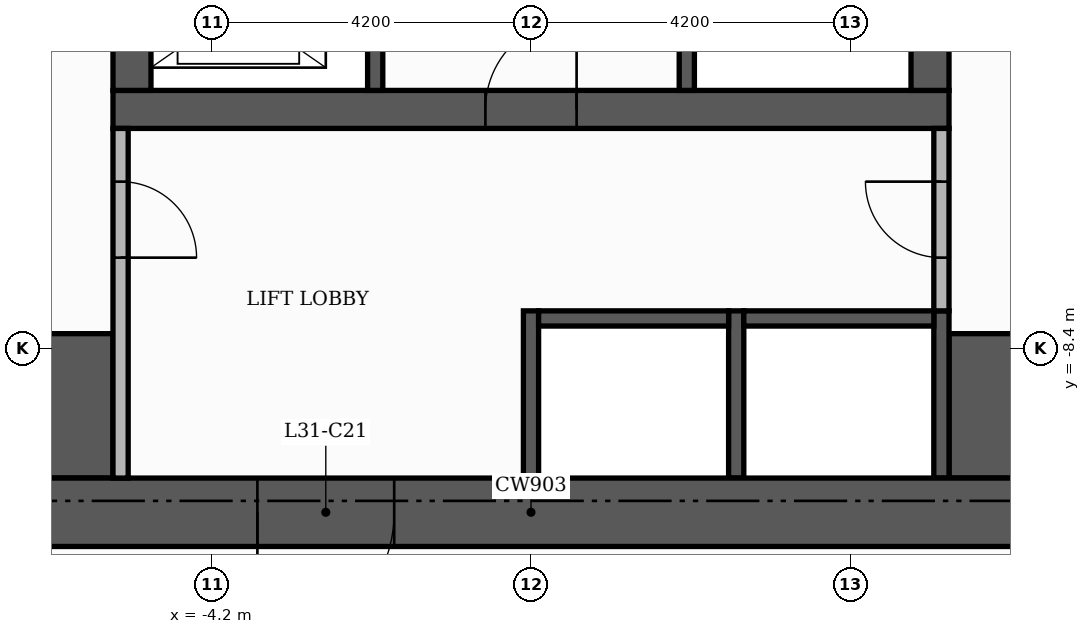
"""IFC4 building model, lengths in metres.
Left out: names, types, materials, properties, quantities, classifications, styles, units other than length and angle.
Written with IfcOpenShell. Run it as: python <this file> out.ifc"""

import sys

from ifc_helpers import new_model, si_unit, direction, frame, frame_2d, origin, place, context, subcontext, project, spatial, rectangle, extrude, element, fill, save


model = new_model("IFC4")
c1 = context("Model", 3, precision=1e-05, world=origin(), true_north=direction((0.0, 1.0)))
c2 = subcontext(c1, "Body", "Model", "MODEL_VIEW")
j1 = project(units=[si_unit("LENGTHUNIT", "METRE"), si_unit("PLANEANGLEUNIT", "RADIAN")], contexts=[c1])
p1 = place(None, origin())
s1 = spatial("IfcSite", under=j1, at=p1, CompositionType="ELEMENT")
p2 = place(p1, origin())
s2 = spatial("IfcBuilding", under=s1, at=p2, CompositionType="ELEMENT")
p3 = place(p2, frame((0.0, 0.0, 133.8)))
s3 = spatial("IfcBuildingStorey", under=s2, at=p3, CompositionType="ELEMENT", Elevation=133.8)
p4 = place(p3, frame((-5.5, -5.25, 0.0), z_axis=(0.0, 0.0, 1.0), x_axis=(1.0, 0.0, 0.0)))
e1 = element("IfcWall", 1, at=p4, inside=s3, PredefinedType="SHEAR", context=c2, shape_type="SweptSolid", body=[
    extrude(rectangle(XDim=11.0, YDim=0.5, at=frame_2d((5.5, 0.0))), origin(), (0.0, 0.0, 1.0), 3.48),
])
p5 = place(p4, frame((4.9, 0.0, 0.0)))
e2 = element("IfcOpeningElement", 2, at=p5, cuts=e1, PredefinedType="OPENING", context=c2, shape_type="SweptSolid", body=[
    extrude(rectangle(XDim=1.2, YDim=2.1, at=frame_2d((0.6, 1.05))), frame((0.0, 0.26, 0.0), z_axis=(0.0, -1.0, 0.0), x_axis=(1.0, 0.0, 0.0)), (0.0, 0.0, 1.0), 0.52),
])
for number, where, z_axis, x_axis in (
    (3, (-5.25, -5.0, 0.0), (0.0, 0.0, 1.0), (0.0, 1.0, 0.0)),
    (4, (5.25, -5.0, 0.0), (0.0, 0.0, 1.0), (0.0, 1.0, 0.0)),
):
    element("IfcWall", number, at=place(p3, frame(where, z_axis=z_axis, x_axis=x_axis)), inside=s3, PredefinedType="SHEAR", context=c2, shape_type="SweptSolid", body=[
        extrude(rectangle(XDim=10.5, YDim=0.5, at=frame_2d((5.25, 0.0))), origin(), (0.0, 0.0, 1.0), 3.48),
    ])
for number, where, z_axis, x_axis in (
    (5, (-10.1, -9.15, 0.0), (0.0, 0.0, 1.0), (1.0, 0.0, 0.0)),
    (6, (5.5, -9.15, 0.0), (0.0, 0.0, 1.0), (1.0, 0.0, 0.0)),
):
    element("IfcWall", number, at=place(p3, frame(where, z_axis=z_axis, x_axis=x_axis)), inside=s3, PredefinedType="SHEAR", context=c2, shape_type="SweptSolid", body=[
        extrude(rectangle(XDim=4.6, YDim=1.9, at=frame_2d((2.3, 0.0))), origin(), (0.0, 0.0, 1.0), 3.48),
    ])
p6 = place(p3, frame((2.05, -5.0, 0.0), z_axis=(0.0, 0.0, 1.0), x_axis=(0.0, 1.0, 0.0)))
e7 = element("IfcWall", 7, at=p6, inside=s3, PredefinedType="SHEAR", context=c2, shape_type="SweptSolid", body=[
    extrude(rectangle(XDim=6.6, YDim=0.2, at=frame_2d((3.3, 0.0))), origin(), (0.0, 0.0, 1.0), 3.48),
])
p7 = place(p6, frame((5.25, 0.0, 0.0)))
e8 = element("IfcOpeningElement", 8, at=p7, cuts=e7, PredefinedType="OPENING", context=c2, shape_type="SweptSolid", body=[
    extrude(rectangle(XDim=1.0, YDim=2.1, at=frame_2d((0.5, 1.05))), frame((0.0, 0.11, 0.0), z_axis=(0.0, -1.0, 0.0), x_axis=(1.0, 0.0, 0.0)), (0.0, 0.0, 1.0), 0.22),
])
for number, where, z_axis, x_axis in (
    (9, (0.0, -10.1, 0.0), (0.0, 0.0, 1.0), (0.0, 1.0, 0.0)),
    (10, (2.7, -10.1, 0.0), (0.0, 0.0, 1.0), (0.0, 1.0, 0.0)),
    (11, (5.4, -10.1, 0.0), (0.0, 0.0, 1.0), (0.0, 1.0, 0.0)),
):
    element("IfcWall", number, at=place(p3, frame(where, z_axis=z_axis, x_axis=x_axis)), inside=s3, PredefinedType="SHEAR", context=c2, shape_type="SweptSolid", body=[
        extrude(rectangle(XDim=2.2, YDim=0.2, at=frame_2d((1.1, 0.0))), origin(), (0.0, 0.0, 1.0), 3.48),
    ])
for number, where, z_axis, x_axis in (
    (12, (0.1, -8.0, 0.0), (0.0, 0.0, 1.0), (1.0, 0.0, 0.0)),
    (13, (2.8, -8.0, 0.0), (0.0, 0.0, 1.0), (1.0, 0.0, 0.0)),
):
    element("IfcWall", number, at=place(p3, frame(where, z_axis=z_axis, x_axis=x_axis)), inside=s3, PredefinedType="SHEAR", context=c2, shape_type="SweptSolid", body=[
        extrude(rectangle(XDim=2.5, YDim=0.2, at=frame_2d((1.25, 0.0))), origin(), (0.0, 0.0, 1.0), 3.48),
    ])
p8 = place(p3, frame((-2.05, -5.0, 0.0), z_axis=(0.0, 0.0, 1.0), x_axis=(0.0, 1.0, 0.0)))
e14 = element("IfcWall", 14, at=p8, inside=s3, PredefinedType="SHEAR", context=c2, shape_type="SweptSolid", body=[
    extrude(rectangle(XDim=3.4, YDim=0.2, at=frame_2d((1.7, 0.0))), origin(), (0.0, 0.0, 1.0), 3.48),
])
p9 = place(p8, frame((0.55, 0.0, 0.0)))
e15 = element("IfcOpeningElement", 15, at=p9, cuts=e14, PredefinedType="OPENING", context=c2, shape_type="SweptSolid", body=[
    extrude(rectangle(XDim=1.1, YDim=2.1, at=frame_2d((0.55, 1.05))), frame((0.0, 0.11, 0.0), z_axis=(0.0, -1.0, 0.0), x_axis=(1.0, 0.0, 0.0)), (0.0, 0.0, 1.0), 0.22),
])
p10 = place(p8, frame((2.45, 0.0, 0.0)))
e16 = element("IfcOpeningElement", 16, at=p10, cuts=e14, PredefinedType="OPENING", context=c2, shape_type="SweptSolid", body=[
    extrude(rectangle(XDim=0.8, YDim=2.1, at=frame_2d((0.4, 1.05))), frame((0.0, 0.11, 0.0), z_axis=(0.0, -1.0, 0.0), x_axis=(1.0, 0.0, 0.0)), (0.0, 0.0, 1.0), 0.22),
])
p11 = place(p3, frame((-11.0, -10.55, 0.0), z_axis=(0.0, 0.0, 1.0), x_axis=(1.0, 0.0, 0.0)))
e17 = element("IfcWall", 17, at=p11, inside=s3, PredefinedType="SHEAR", context=c2, shape_type="SweptSolid", body=[
    extrude(rectangle(XDim=22.0, YDim=0.9, at=frame_2d((11.0, 0.0))), origin(), (0.0, 0.0, 1.0), 3.48),
])
p12 = place(p11, frame((7.4, 0.0, 0.0)))
e18 = element("IfcOpeningElement", 18, at=p12, cuts=e17, PredefinedType="OPENING", context=c2, shape_type="SweptSolid", body=[
    extrude(rectangle(XDim=1.8, YDim=2.2, at=frame_2d((0.9, 1.1))), frame((0.0, 0.46, 0.0), z_axis=(0.0, -1.0, 0.0), x_axis=(1.0, 0.0, 0.0)), (0.0, 0.0, 1.0), 0.92),
])
p13 = place(p3, frame((-5.4, -10.1, 0.0), z_axis=(0.0, 0.0, 1.0), x_axis=(0.0, 1.0, 0.0)))
e19 = element("IfcWall", 19, at=p13, inside=s3, PredefinedType="PARTITIONING", context=c2, shape_type="SweptSolid", body=[
    extrude(rectangle(XDim=4.6, YDim=0.2, at=frame_2d((2.3, 0.0))), origin(), (0.0, 0.0, 1.0), 3.48),
])
p14 = place(p13, frame((2.9, 0.0, 0.0)))
e20 = element("IfcOpeningElement", 20, at=p14, cuts=e19, PredefinedType="OPENING", context=c2, shape_type="SweptSolid", body=[
    extrude(rectangle(XDim=1.0, YDim=2.1, at=frame_2d((0.5, 1.05))), frame((0.0, 0.11, 0.0), z_axis=(0.0, -1.0, 0.0), x_axis=(1.0, 0.0, 0.0)), (0.0, 0.0, 1.0), 0.22),
])
p15 = place(p3, frame((5.4, -7.9, 0.0), z_axis=(0.0, 0.0, 1.0), x_axis=(0.0, 1.0, 0.0)))
e21 = element("IfcWall", 21, at=p15, inside=s3, PredefinedType="PARTITIONING", context=c2, shape_type="SweptSolid", body=[
    extrude(rectangle(XDim=2.4, YDim=0.2, at=frame_2d((1.2, 0.0))), origin(), (0.0, 0.0, 1.0), 3.48),
])
p16 = place(p15, frame((0.7, 0.0, 0.0)))
e22 = element("IfcOpeningElement", 22, at=p16, cuts=e21, PredefinedType="OPENING", context=c2, shape_type="SweptSolid", body=[
    extrude(rectangle(XDim=1.0, YDim=2.1, at=frame_2d((0.5, 1.05))), frame((0.0, 0.11, 0.0), z_axis=(0.0, -1.0, 0.0), x_axis=(1.0, 0.0, 0.0)), (0.0, 0.0, 1.0), 0.22),
])
p17 = place(p5, origin())
e23 = element("IfcDoor", 23, at=p17, inside=s3, OperationType="SINGLE_SWING_RIGHT", PredefinedType="DOOR", context=c2, shape_type="SweptSolid", body=[
    extrude(rectangle(XDim=1.2, YDim=2.1, at=frame_2d((0.6, 1.05))), frame((0.0, 0.025, 0.0), z_axis=(0.0, -1.0, 0.0), x_axis=(1.0, 0.0, 0.0)), (0.0, 0.0, 1.0), 0.05),
])
fill(e2, e23)
p18 = place(p14, frame((1.0, 0.0, 0.0), z_axis=(0.0, 0.0, 1.0), x_axis=(-1.0, 0.0, 0.0)))
e24 = element("IfcDoor", 24, at=p18, inside=s3, OperationType="SINGLE_SWING_LEFT", PredefinedType="DOOR", context=c2, shape_type="SweptSolid", body=[
    extrude(rectangle(XDim=1.0, YDim=2.1, at=frame_2d((0.5, 1.05))), frame((0.0, 0.025, 0.0), z_axis=(0.0, -1.0, 0.0), x_axis=(1.0, 0.0, 0.0)), (0.0, 0.0, 1.0), 0.05),
])
fill(e20, e24)
p19 = place(p16, origin())
e25 = element("IfcDoor", 25, at=p19, inside=s3, OperationType="SINGLE_SWING_RIGHT", PredefinedType="DOOR", context=c2, shape_type="SweptSolid", body=[
    extrude(rectangle(XDim=1.0, YDim=2.1, at=frame_2d((0.5, 1.05))), frame((0.0, 0.025, 0.0), z_axis=(0.0, -1.0, 0.0), x_axis=(1.0, 0.0, 0.0)), (0.0, 0.0, 1.0), 0.05),
])
fill(e22, e25)
p20 = place(p12, frame((1.8, 0.0, 0.0), z_axis=(0.0, 0.0, 1.0), x_axis=(-1.0, 0.0, 0.0)))
e26 = element("IfcDoor", 26, at=p20, inside=s3, OperationType="DOUBLE_DOOR_SINGLE_SWING", PredefinedType="DOOR", context=c2, shape_type="SweptSolid", body=[
    extrude(rectangle(XDim=1.8, YDim=2.2, at=frame_2d((0.9, 1.1))), frame((0.0, 0.025, 0.0), z_axis=(0.0, -1.0, 0.0), x_axis=(1.0, 0.0, 0.0)), (0.0, 0.0, 1.0), 0.05),
])
fill(e18, e26)
save(model, sys.argv[1])
